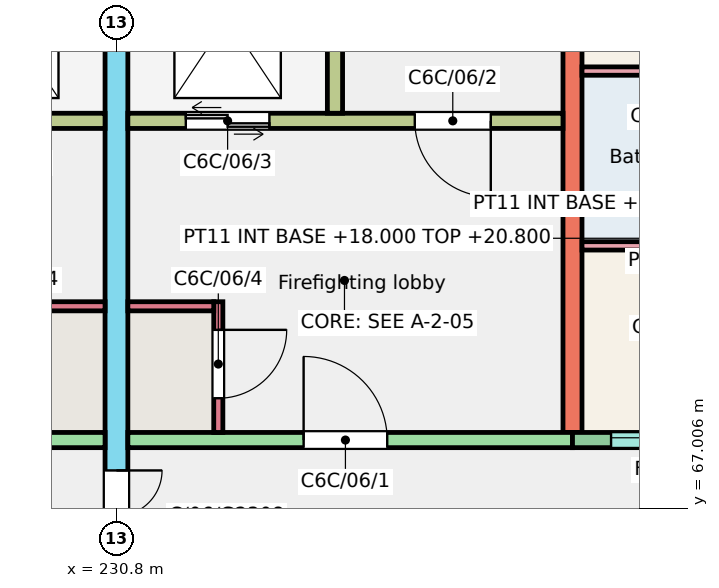
"""IFC4 building model, lengths in metres.
Left out: names, types, materials, properties, quantities, classifications, styles, units other than length and angle.
Written with IfcOpenShell. Run it as: python <this file> out.ifc"""

import sys

from ifc_helpers import new_model, si_unit, direction, frame, frame_2d, origin, place, context, subcontext, project, spatial, rectangle, extrude, element, fill, save


model = new_model("IFC4")
c1 = context("Model", 3, precision=1e-05, world=origin(), true_north=direction((0.0, 1.0)))
c2 = subcontext(c1, "Body", "Model", "MODEL_VIEW")
j1 = project(units=[si_unit("LENGTHUNIT", "METRE"), si_unit("PLANEANGLEUNIT", "RADIAN")], contexts=[c1])
p1 = place(None, origin())
s1 = spatial("IfcSite", under=j1, at=p1, CompositionType="ELEMENT")
p2 = place(p1, origin())
s2 = spatial("IfcBuilding", under=s1, at=p2, CompositionType="ELEMENT")
p3 = place(p2, frame((0.0, 0.0, 18.0)))
s3 = spatial("IfcBuildingStorey", under=s2, at=p3, CompositionType="ELEMENT", Elevation=18.0)
p4 = place(p3, frame((230.8, 66.0, 0.0), z_axis=(0.0, 0.0, 1.0), x_axis=(0.0, 1.0, 0.0)))
e1 = element("IfcWall", 1, at=p4, inside=s3, PredefinedType="SHEAR", context=c2, shape_type="SweptSolid", body=[
    extrude(rectangle(XDim=11.0, YDim=0.3, at=frame_2d((5.5, 0.0))), origin(), (0.0, 0.0, 1.0), 3.0),
])
p5 = place(p4, frame((0.3, 0.0, 0.0)))
e2 = element("IfcOpeningElement", 2, at=p5, cuts=e1, PredefinedType="OPENING", context=c2, shape_type="SweptSolid", body=[
    extrude(rectangle(XDim=1.2, YDim=2.1, at=frame_2d((0.6, 1.05))), frame((0.0, 0.16, 0.0), z_axis=(0.0, -1.0, 0.0), x_axis=(1.0, 0.0, 0.0)), (0.0, 0.0, 1.0), 0.32),
])
p6 = place(p3, frame((236.8, 68.0, 0.0), z_axis=(0.0, 0.0, 1.0), x_axis=(0.0, 1.0, 0.0)))
e3 = element("IfcWall", 3, at=p6, inside=s3, PredefinedType="SHEAR", context=c2, shape_type="SweptSolid", body=[
    extrude(rectangle(XDim=9.0, YDim=0.25, at=frame_2d((4.5, 0.0))), origin(), (0.0, 0.0, 1.0), 3.0),
])
p7 = place(p3, frame((224.8, 67.9, 0.0), z_axis=(0.0, 0.0, 1.0), x_axis=(1.0, 0.0, 0.0)))
e4 = element("IfcWall", 4, at=p7, inside=s3, PredefinedType="SHEAR", context=c2, shape_type="SweptSolid", body=[
    extrude(rectangle(XDim=5.85, YDim=0.2, at=frame_2d((2.925, 0.0))), origin(), (0.0, 0.0, 1.0), 3.0),
])
p8 = place(p7, frame((2.438, 0.0, 0.0)))
e5 = element("IfcOpeningElement", 5, at=p8, cuts=e4, PredefinedType="OPENING", context=c2, shape_type="SweptSolid", body=[
    extrude(rectangle(XDim=1.1, YDim=2.1, at=frame_2d((0.55, 1.05))), frame((0.0, 0.11, 0.0), z_axis=(0.0, -1.0, 0.0), x_axis=(1.0, 0.0, 0.0)), (0.0, 0.0, 1.0), 0.22),
])
p9 = place(p3, frame((224.925, 72.1, 0.0), z_axis=(0.0, 0.0, 1.0), x_axis=(1.0, 0.0, 0.0)))
e6 = element("IfcWall", 6, at=p9, inside=s3, PredefinedType="SHEAR", context=c2, shape_type="SweptSolid", body=[
    extrude(rectangle(XDim=5.725, YDim=0.2, at=frame_2d((2.862, 0.0))), origin(), (0.0, 0.0, 1.0), 3.0),
])
p10 = place(p9, frame((0.95, 0.0, 0.0)))
e7 = element("IfcOpeningElement", 7, at=p10, cuts=e6, PredefinedType="OPENING", context=c2, shape_type="SweptSolid", body=[
    extrude(rectangle(XDim=1.0, YDim=2.1, at=frame_2d((0.5, 1.05))), frame((0.0, 0.11, 0.0), z_axis=(0.0, -1.0, 0.0), x_axis=(1.0, 0.0, 0.0)), (0.0, 0.0, 1.0), 0.22),
])
p11 = place(p9, frame((3.863, 0.0, 0.0)))
e8 = element("IfcOpeningElement", 8, at=p11, cuts=e6, PredefinedType="OPENING", context=c2, shape_type="SweptSolid", body=[
    extrude(rectangle(XDim=1.1, YDim=2.1, at=frame_2d((0.55, 1.05))), frame((0.0, 0.11, 0.0), z_axis=(0.0, -1.0, 0.0), x_axis=(1.0, 0.0, 0.0)), (0.0, 0.0, 1.0), 0.22),
])
p12 = place(p3, frame((229.52, 69.66, 0.0), z_axis=(0.0, 0.0, 1.0), x_axis=(1.0, 0.0, 0.0)))
e9 = element("IfcWall", 9, at=p12, inside=s3, PredefinedType="SHEAR", context=c2, shape_type="SweptSolid", body=[
    extrude(rectangle(XDim=1.13, YDim=0.12, at=frame_2d((0.565, 0.0))), origin(), (0.0, 0.0, 1.0), 3.0),
])
p13 = place(p3, frame((230.95, 67.9, 0.0), z_axis=(0.0, 0.0, 1.0), x_axis=(1.0, 0.0, 0.0)))
e10 = element("IfcWall", 10, at=p13, inside=s3, PredefinedType="SHEAR", context=c2, shape_type="SweptSolid", body=[
    extrude(rectangle(XDim=5.85, YDim=0.2, at=frame_2d((2.925, 0.0))), origin(), (0.0, 0.0, 1.0), 3.0),
])
p14 = place(p13, frame((2.312, 0.0, 0.0)))
e11 = element("IfcOpeningElement", 11, at=p14, cuts=e10, PredefinedType="OPENING", context=c2, shape_type="SweptSolid", body=[
    extrude(rectangle(XDim=1.1, YDim=2.1, at=frame_2d((0.55, 1.05))), frame((0.0, 0.11, 0.0), z_axis=(0.0, -1.0, 0.0), x_axis=(1.0, 0.0, 0.0)), (0.0, 0.0, 1.0), 0.22),
])
p15 = place(p3, frame((230.95, 72.1, 0.0), z_axis=(0.0, 0.0, 1.0), x_axis=(1.0, 0.0, 0.0)))
e12 = element("IfcWall", 12, at=p15, inside=s3, PredefinedType="SHEAR", context=c2, shape_type="SweptSolid", body=[
    extrude(rectangle(XDim=5.725, YDim=0.2, at=frame_2d((2.863, 0.0))), origin(), (0.0, 0.0, 1.0), 3.0),
])
p16 = place(p15, frame((3.775, 0.0, 0.0)))
e13 = element("IfcOpeningElement", 13, at=p16, cuts=e12, PredefinedType="OPENING", context=c2, shape_type="SweptSolid", body=[
    extrude(rectangle(XDim=1.0, YDim=2.1, at=frame_2d((0.5, 1.05))), frame((0.0, 0.11, 0.0), z_axis=(0.0, -1.0, 0.0), x_axis=(1.0, 0.0, 0.0)), (0.0, 0.0, 1.0), 0.22),
])
p17 = place(p15, frame((0.762, 0.0, 0.0)))
e14 = element("IfcOpeningElement", 14, at=p17, cuts=e12, PredefinedType="OPENING", context=c2, shape_type="SweptSolid", body=[
    extrude(rectangle(XDim=1.1, YDim=2.1, at=frame_2d((0.55, 1.05))), frame((0.0, 0.11, 0.0), z_axis=(0.0, -1.0, 0.0), x_axis=(1.0, 0.0, 0.0)), (0.0, 0.0, 1.0), 0.22),
])
p18 = place(p3, frame((233.675, 72.2, 0.0), z_axis=(0.0, 0.0, 1.0), x_axis=(0.0, 1.0, 0.0)))
e15 = element("IfcWall", 15, at=p18, inside=s3, PredefinedType="SHEAR", context=c2, shape_type="SweptSolid", body=[
    extrude(rectangle(XDim=4.8, YDim=0.2, at=frame_2d((2.4, 0.0))), origin(), (0.0, 0.0, 1.0), 3.0),
])
p19 = place(p3, frame((232.14, 68.0, 0.0), z_axis=(0.0, 0.0, 1.0), x_axis=(0.0, 1.0, 0.0)))
e16 = element("IfcWall", 16, at=p19, inside=s3, PredefinedType="SHEAR", context=c2, shape_type="SweptSolid", body=[
    extrude(rectangle(XDim=1.72, YDim=0.12, at=frame_2d((0.86, 0.0))), origin(), (0.0, 0.0, 1.0), 3.0),
])
p20 = place(p19, frame((0.45, 0.0, 0.0)))
e17 = element("IfcOpeningElement", 17, at=p20, cuts=e16, PredefinedType="OPENING", context=c2, shape_type="SweptSolid", body=[
    extrude(rectangle(XDim=0.9, YDim=2.1, at=frame_2d((0.45, 1.05))), frame((0.0, 0.07, 0.0), z_axis=(0.0, -1.0, 0.0), x_axis=(1.0, 0.0, 0.0)), (0.0, 0.0, 1.0), 0.14),
])
p21 = place(p3, frame((230.95, 69.66, 0.0), z_axis=(0.0, 0.0, 1.0), x_axis=(1.0, 0.0, 0.0)))
e18 = element("IfcWall", 18, at=p21, inside=s3, PredefinedType="SHEAR", context=c2, shape_type="SweptSolid", body=[
    extrude(rectangle(XDim=1.13, YDim=0.12, at=frame_2d((0.565, 0.0))), origin(), (0.0, 0.0, 1.0), 3.0),
])
p22 = place(p3, frame((236.8, 67.9, 0.0), z_axis=(0.0, 0.0, 1.0), x_axis=(1.0, 0.0, 0.0)))
e19 = element("IfcWall", 19, at=p22, inside=s3, PredefinedType="SOLIDWALL", context=c2, shape_type="SweptSolid", body=[
    extrude(rectangle(XDim=3.6, YDim=0.2, at=frame_2d((1.8, 0.0))), origin(), (0.0, 0.0, 1.0), 3.0),
])
p23 = place(p22, frame((0.508, 0.0, 1.1)))
e20 = element("IfcOpeningElement", 20, at=p23, cuts=e19, PredefinedType="OPENING", context=c2, shape_type="SweptSolid", body=[
    extrude(rectangle(XDim=1.2, YDim=1.3, at=frame_2d((0.6, 0.65))), frame((0.0, 0.11, 0.0), z_axis=(0.0, -1.0, 0.0), x_axis=(1.0, 0.0, 0.0)), (0.0, 0.0, 1.0), 0.22),
])
p24 = place(p22, frame((2.35, 0.0, 0.0)))
e21 = element("IfcOpeningElement", 21, at=p24, cuts=e19, PredefinedType="OPENING", context=c2, shape_type="SweptSolid", body=[
    extrude(rectangle(XDim=1.0, YDim=2.1, at=frame_2d((0.5, 1.05))), frame((0.0, 0.11, 0.0), z_axis=(0.0, -1.0, 0.0), x_axis=(1.0, 0.0, 0.0)), (0.0, 0.0, 1.0), 0.22),
])
p25 = place(p3, frame((236.925, 70.455, 0.0), z_axis=(0.0, 0.0, 1.0), x_axis=(1.0, 0.0, 0.0)))
e22 = element("IfcWall", 22, at=p25, inside=s3, PredefinedType="PARTITIONING", context=c2, shape_type="SweptSolid", body=[
    extrude(rectangle(XDim=1.965, YDim=0.11, at=frame_2d((0.982, 0.0))), origin(), (0.0, 0.0, 1.0), 2.8),
])
p26 = place(p3, frame((236.925, 72.755, 0.0), z_axis=(0.0, 0.0, 1.0), x_axis=(1.0, 0.0, 0.0)))
e23 = element("IfcWall", 23, at=p26, inside=s3, PredefinedType="PARTITIONING", context=c2, shape_type="SweptSolid", body=[
    extrude(rectangle(XDim=3.375, YDim=0.11, at=frame_2d((1.688, 0.0))), origin(), (0.0, 0.0, 1.0), 2.8),
])
p27 = place(p26, frame((2.275, 0.0, 0.0)))
e24 = element("IfcOpeningElement", 24, at=p27, cuts=e23, PredefinedType="OPENING", context=c2, shape_type="SweptSolid", body=[
    extrude(rectangle(XDim=0.9, YDim=2.1, at=frame_2d((0.45, 1.05))), frame((0.0, 0.065, 0.0), z_axis=(0.0, -1.0, 0.0), x_axis=(1.0, 0.0, 0.0)), (0.0, 0.0, 1.0), 0.13),
])
p28 = place(p23, origin())
e25 = element("IfcWindow", 25, at=p28, inside=s3, PartitioningType="SINGLE_PANEL", PredefinedType="WINDOW", context=c2, shape_type="SweptSolid", body=[
    extrude(rectangle(XDim=1.2, YDim=1.3, at=frame_2d((0.6, 0.65))), frame((0.0, 0.06, 0.0), z_axis=(0.0, -1.0, 0.0), x_axis=(1.0, 0.0, 0.0)), (0.0, 0.0, 1.0), 0.06),
])
fill(e20, e25)
p29 = place(p14, origin())
e26 = element("IfcDoor", 26, at=p29, inside=s3, OperationType="SINGLE_SWING_LEFT", PredefinedType="DOOR", context=c2, shape_type="SweptSolid", body=[
    extrude(rectangle(XDim=1.1, YDim=2.1, at=frame_2d((0.55, 1.05))), frame((0.0, 0.025, 0.0), z_axis=(0.0, -1.0, 0.0), x_axis=(1.0, 0.0, 0.0)), (0.0, 0.0, 1.0), 0.05),
])
fill(e11, e26)
p30 = place(p16, origin())
e27 = element("IfcDoor", 27, at=p30, inside=s3, OperationType="SINGLE_SWING_RIGHT", PredefinedType="DOOR", context=c2, shape_type="SweptSolid", body=[
    extrude(rectangle(XDim=1.0, YDim=2.1, at=frame_2d((0.5, 1.05))), frame((0.0, 0.025, 0.0), z_axis=(0.0, -1.0, 0.0), x_axis=(1.0, 0.0, 0.0)), (0.0, 0.0, 1.0), 0.05),
])
fill(e13, e27)
p31 = place(p17, origin())
e28 = element("IfcDoor", 28, at=p31, inside=s3, OperationType="DOUBLE_DOOR_SLIDING", PredefinedType="DOOR", context=c2, shape_type="SweptSolid", body=[
    extrude(rectangle(XDim=1.1, YDim=2.1, at=frame_2d((0.55, 1.05))), frame((0.0, 0.025, 0.0), z_axis=(0.0, -1.0, 0.0), x_axis=(1.0, 0.0, 0.0)), (0.0, 0.0, 1.0), 0.05),
])
fill(e14, e28)
p32 = place(p20, origin())
e29 = element("IfcDoor", 29, at=p32, inside=s3, OperationType="SINGLE_SWING_RIGHT", PredefinedType="DOOR", context=c2, shape_type="SweptSolid", body=[
    extrude(rectangle(XDim=0.9, YDim=2.1, at=frame_2d((0.45, 1.05))), frame((0.0, 0.025, 0.0), z_axis=(0.0, -1.0, 0.0), x_axis=(1.0, 0.0, 0.0)), (0.0, 0.0, 1.0), 0.05),
])
fill(e17, e29)
p33 = place(p5, origin())
e30 = element("IfcDoor", 30, at=p33, inside=s3, OperationType="DOUBLE_DOOR_SINGLE_SWING", PredefinedType="DOOR", context=c2, shape_type="SweptSolid", body=[
    extrude(rectangle(XDim=1.2, YDim=2.1, at=frame_2d((0.6, 1.05))), frame((0.0, 0.025, 0.0), z_axis=(0.0, -1.0, 0.0), x_axis=(1.0, 0.0, 0.0)), (0.0, 0.0, 1.0), 0.05),
])
fill(e2, e30)
save(model, sys.argv[1])
